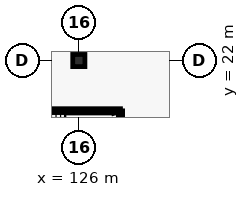
"""IFC4 building model, lengths in metres.
Left out: names, types, materials, properties, quantities, classifications, styles, units other than length and angle.
Written with IfcOpenShell. Run it as: python <this file> out.ifc"""

import sys

from ifc_helpers import new_model, si_unit, direction, frame, frame_2d, origin, origin_2d, place, context, subcontext, project, spatial, rectangle, extrude, element, save


model = new_model("IFC4")
c1 = context("Model", 3, precision=1e-05, world=origin(), true_north=direction((0.0, 1.0)))
c2 = subcontext(c1, "Body", "Model", "MODEL_VIEW")
j1 = project(units=[si_unit("LENGTHUNIT", "METRE"), si_unit("PLANEANGLEUNIT", "RADIAN")], contexts=[c1])
p1 = place(None, origin())
s1 = spatial("IfcSite", under=j1, at=p1, CompositionType="ELEMENT")
p2 = place(p1, origin())
s2 = spatial("IfcBuilding", under=s1, at=p2, CompositionType="ELEMENT")
p3 = place(p2, frame((0.0, 0.0, 5.44)))
s3 = spatial("IfcBuildingStorey", under=s2, at=p3, CompositionType="ELEMENT", Elevation=5.44)
p4 = place(p3, frame((126.0, 22.0, 0.0), z_axis=(0.0, 0.0, 1.0), x_axis=(1.0, 0.0, 0.0)))
e1 = element("IfcColumn", 1, at=p4, inside=s3, PredefinedType="COLUMN", context=c2, shape_type="SweptSolid", body=[
    extrude(rectangle(XDim=0.8, YDim=0.8, at=origin_2d()), origin(), (0.0, 0.0, 1.0), 4.16),
])
p5 = place(p3, frame((119.86, 18.69, 0.0), z_axis=(0.0, 0.0, 1.0), x_axis=(1.0, 0.0, 0.0)))
e2 = element("IfcWall", 2, at=p5, inside=s3, PredefinedType="SHEAR", context=c2, shape_type="SweptSolid", body=[
    extrude(rectangle(XDim=8.88, YDim=0.28, at=frame_2d((4.44, 0.0))), origin(), (0.0, 0.0, 1.0), 4.16),
])
p6 = place(p3, frame((128.74, 15.26, 0.0), z_axis=(0.0, 0.0, 1.0), x_axis=(0.0, 1.0, 0.0)))
e3 = element("IfcWall", 3, at=p6, inside=s3, PredefinedType="SHEAR", context=c2, shape_type="SweptSolid", body=[
    extrude(rectangle(XDim=3.43, YDim=0.28, at=frame_2d((1.715, 0.0))), origin(), (0.0, 0.0, 1.0), 4.16),
])
save(model, sys.argv[1])
